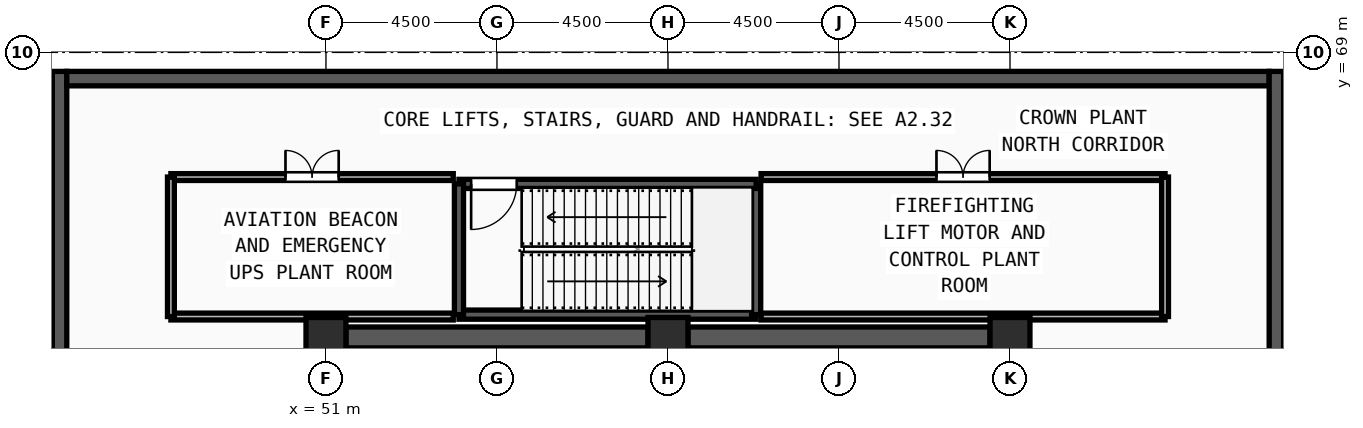
"""IFC4 building model, lengths in metres.
Left out: names, types, materials, properties, quantities, classifications, styles, units other than length and angle.
Written with IfcOpenShell. Run it as: python <this file> out.ifc"""

import sys

from ifc_helpers import new_model, si_unit, direction, frame, frame_2d, origin, origin_2d, place, context, subcontext, project, spatial, rectangle, extrude, source, transform, mapped, element, fill, save


model = new_model("IFC4")
c1 = context("Model", 3, precision=1e-05, world=origin(), true_north=direction((0.0, 1.0)))
c2 = subcontext(c1, "Body", "Model", "MODEL_VIEW")
j1 = project(units=[si_unit("LENGTHUNIT", "METRE"), si_unit("PLANEANGLEUNIT", "RADIAN")], contexts=[c1])
p1 = place(None, origin())
s1 = spatial("IfcSite", under=j1, at=p1, CompositionType="ELEMENT")
p2 = place(p1, origin())
s2 = spatial("IfcBuilding", under=s1, at=p2, CompositionType="ELEMENT")
p3 = place(p2, frame((0.0, 0.0, 366.0)))
s3 = spatial("IfcBuildingStorey", under=s2, at=p3, CompositionType="ELEMENT", Elevation=366.0)
m1 = source(origin(), c2, "Body", "SweptSolid", [
    extrude(rectangle(XDim=1.05, YDim=1.05, at=origin_2d()), origin(), (0.0, 0.0, 1.0), 5.4),
])
for number, where, z_axis, x_axis in (
    (1, (69.0, 61.5, 0.0), (0.0, 0.0, 1.0), (1.0, 0.0, 0.0)),
    (2, (60.0, 61.5, 0.0), (0.0, 0.0, 1.0), (1.0, 0.0, 0.0)),
    (3, (51.0, 61.5, 0.0), (0.0, 0.0, 1.0), (1.0, 0.0, 0.0)),
):
    element("IfcColumn", number, at=place(p3, frame(where, z_axis=z_axis, x_axis=x_axis)), inside=s3, PredefinedType="COLUMN", context=c2, shape_type="MappedRepresentation", body=[
        mapped(m1, transform((0.0, 0.0, 0.0), x_axis=(1.0, 0.0, 0.0), y_axis=(0.0, 1.0, 0.0), z_axis=(0.0, 0.0, 1.0), scale=1.0)),
    ])
p4 = place(p3, frame((43.99, 41.2, 0.0), z_axis=(0.0, 0.0, 1.0), x_axis=(0.0, 1.0, 0.0)))
e4 = element("IfcWall", 4, at=p4, inside=s3, PredefinedType="SOLIDWALL", context=c2, shape_type="SweptSolid", body=[
    extrude(rectangle(XDim=27.3, YDim=0.38, at=frame_2d((13.65, 0.0))), origin(), (0.0, 0.0, 1.0), 4.95),
])
p5 = place(p3, frame((44.18, 68.31, 0.0), z_axis=(0.0, 0.0, 1.0), x_axis=(1.0, 0.0, 0.0)))
e5 = element("IfcWall", 5, at=p5, inside=s3, PredefinedType="SOLIDWALL", context=c2, shape_type="SweptSolid", body=[
    extrude(rectangle(XDim=31.64, YDim=0.38, at=frame_2d((15.82, 0.0))), origin(), (0.0, 0.0, 1.0), 4.95),
])
p6 = place(p3, frame((76.01, 68.5, 0.0), z_axis=(0.0, 0.0, 1.0), x_axis=(0.0, -1.0, 0.0)))
e6 = element("IfcWall", 6, at=p6, inside=s3, PredefinedType="SOLIDWALL", context=c2, shape_type="SweptSolid", body=[
    extrude(rectangle(XDim=27.3, YDim=0.38, at=frame_2d((13.65, 0.0))), origin(), (0.0, 0.0, 1.0), 4.95),
])
for number, where, z_axis, x_axis in (
    (7, (51.525, 61.5, 0.0), (0.0, 0.0, 1.0), (1.0, 0.0, 0.0)),
    (8, (60.525, 61.5, 0.0), (0.0, 0.0, 1.0), (1.0, 0.0, 0.0)),
):
    element("IfcWall", number, at=place(p3, frame(where, z_axis=z_axis, x_axis=x_axis)), inside=s3, PredefinedType="SHEAR", context=c2, shape_type="SweptSolid", body=[
        extrude(rectangle(XDim=7.95, YDim=0.55, at=frame_2d((3.975, 0.0))), origin(), (0.0, 0.0, 1.0), 4.95),
    ])
p7 = place(p3, frame((54.5, 62.1, 0.0), z_axis=(0.0, 0.0, 1.0), x_axis=(1.0, 0.0, 0.0)))
e9 = element("IfcWall", 9, at=p7, inside=s3, PredefinedType="SOLIDWALL", context=c2, shape_type="SweptSolid", body=[
    extrude(rectangle(XDim=7.82, YDim=0.24, at=frame_2d((3.91, 0.0))), origin(), (0.0, 0.0, 1.0), 4.95),
])
p8 = place(p3, frame((62.32, 62.1, 0.0), z_axis=(0.0, 0.0, 1.0), x_axis=(0.0, 1.0, 0.0)))
e10 = element("IfcWall", 10, at=p8, inside=s3, PredefinedType="SOLIDWALL", context=c2, shape_type="SweptSolid", body=[
    extrude(rectangle(XDim=3.44, YDim=0.24, at=frame_2d((1.72, 0.0))), origin(), (0.0, 0.0, 1.0), 4.95),
])
p9 = place(p3, frame((62.32, 65.54, 0.0), z_axis=(0.0, 0.0, 1.0), x_axis=(-1.0, 0.0, 0.0)))
e11 = element("IfcWall", 11, at=p9, inside=s3, PredefinedType="SOLIDWALL", context=c2, shape_type="SweptSolid", body=[
    extrude(rectangle(XDim=7.82, YDim=0.24, at=frame_2d((3.91, 0.0))), origin(), (0.0, 0.0, 1.0), 4.95),
])
m2 = source(origin(), c2, "Body", "SweptSolid", [
    extrude(rectangle(XDim=1.2, YDim=2.2, at=frame_2d((0.6, 1.1))), frame((0.0, 0.13, 0.0), z_axis=(0.0, -1.0, 0.0), x_axis=(1.0, 0.0, 0.0)), (0.0, 0.0, 1.0), 0.26),
])
p10 = place(p9, frame((6.3, 0.0, 0.0)))
e12 = element("IfcOpeningElement", 12, at=p10, cuts=e11, PredefinedType="OPENING", context=c2, shape_type="MappedRepresentation", body=[
    mapped(m2, transform((0.0, 0.0, 0.0), x_axis=(1.0, 0.0, 0.0), y_axis=(0.0, 1.0, 0.0), z_axis=(0.0, 0.0, 1.0), scale=1.0)),
])
p11 = place(p3, frame((54.5, 65.54, 0.0), z_axis=(0.0, 0.0, 1.0), x_axis=(0.0, -1.0, 0.0)))
e13 = element("IfcWall", 13, at=p11, inside=s3, PredefinedType="SOLIDWALL", context=c2, shape_type="SweptSolid", body=[
    extrude(rectangle(XDim=3.44, YDim=0.24, at=frame_2d((1.72, 0.0))), origin(), (0.0, 0.0, 1.0), 4.95),
])
p12 = place(p3, frame((46.92, 65.72, 0.0), z_axis=(0.0, 0.0, 1.0), x_axis=(1.0, 0.0, 0.0)))
e14 = element("IfcWall", 14, at=p12, inside=s3, PredefinedType="PARTITIONING", context=c2, shape_type="SweptSolid", body=[
    extrude(rectangle(XDim=7.43, YDim=0.18, at=frame_2d((3.715, 0.0))), origin(), (0.0, 0.0, 1.0), 4.95),
])
m3 = source(origin(), c2, "Body", "SweptSolid", [
    extrude(rectangle(XDim=1.4, YDim=2.25, at=frame_2d((0.7, 1.125))), frame((0.0, 0.1, 0.0), z_axis=(0.0, -1.0, 0.0), x_axis=(1.0, 0.0, 0.0)), (0.0, 0.0, 1.0), 0.2),
])
p13 = place(p12, frame((3.015, 0.0, 0.0)))
e15 = element("IfcOpeningElement", 15, at=p13, cuts=e14, PredefinedType="OPENING", context=c2, shape_type="MappedRepresentation", body=[
    mapped(m3, transform((0.0, 0.0, 0.0), x_axis=(1.0, 0.0, 0.0), y_axis=(0.0, 1.0, 0.0), z_axis=(0.0, 0.0, 1.0), scale=1.0)),
])
p14 = place(p3, frame((62.45, 65.72, 0.0), z_axis=(0.0, 0.0, 1.0), x_axis=(1.0, 0.0, 0.0)))
e16 = element("IfcWall", 16, at=p14, inside=s3, PredefinedType="PARTITIONING", context=c2, shape_type="SweptSolid", body=[
    extrude(rectangle(XDim=10.63, YDim=0.18, at=frame_2d((5.315, 0.0))), origin(), (0.0, 0.0, 1.0), 4.95),
])
p15 = place(p14, frame((4.615, 0.0, 0.0)))
e17 = element("IfcOpeningElement", 17, at=p15, cuts=e16, PredefinedType="OPENING", context=c2, shape_type="MappedRepresentation", body=[
    mapped(m3, transform((0.0, 0.0, 0.0), x_axis=(1.0, 0.0, 0.0), y_axis=(0.0, 1.0, 0.0), z_axis=(0.0, 0.0, 1.0), scale=1.0)),
])
p16 = place(p3, frame((46.92, 62.05, 0.0), z_axis=(0.0, 0.0, 1.0), x_axis=(1.0, 0.0, 0.0)))
e18 = element("IfcWall", 18, at=p16, inside=s3, PredefinedType="PARTITIONING", context=c2, shape_type="SweptSolid", body=[
    extrude(rectangle(XDim=7.43, YDim=0.18, at=frame_2d((3.715, 0.0))), origin(), (0.0, 0.0, 1.0), 4.235),
])
p17 = place(p3, frame((62.45, 62.05, 0.0), z_axis=(0.0, 0.0, 1.0), x_axis=(1.0, 0.0, 0.0)))
e19 = element("IfcWall", 19, at=p17, inside=s3, PredefinedType="PARTITIONING", context=c2, shape_type="SweptSolid", body=[
    extrude(rectangle(XDim=10.63, YDim=0.18, at=frame_2d((5.315, 0.0))), origin(), (0.0, 0.0, 1.0), 4.235),
])
for number, where, z_axis, x_axis in (
    (20, (46.92, 62.05, 0.0), (0.0, 0.0, 1.0), (0.0, 1.0, 0.0)),
    (21, (73.08, 62.05, 0.0), (0.0, 0.0, 1.0), (0.0, 1.0, 0.0)),
):
    element("IfcWall", number, at=place(p3, frame(where, z_axis=z_axis, x_axis=x_axis)), inside=s3, PredefinedType="PARTITIONING", context=c2, shape_type="SweptSolid", body=[
        extrude(rectangle(XDim=3.67, YDim=0.18, at=frame_2d((1.835, 0.0))), origin(), (0.0, 0.0, 1.0), 4.95),
    ])
m4 = source(origin(), c2, "Body", "SweptSolid", [
    extrude(rectangle(XDim=1.2, YDim=2.2, at=frame_2d((0.6, 1.1))), frame((0.0, 0.025, 0.0), z_axis=(0.0, -1.0, 0.0), x_axis=(1.0, 0.0, 0.0)), (0.0, 0.0, 1.0), 0.05),
])
p18 = place(p10, origin())
e22 = element("IfcDoor", 22, at=p18, inside=s3, OperationType="SINGLE_SWING_RIGHT", PredefinedType="DOOR", context=c2, shape_type="MappedRepresentation", body=[
    mapped(m4, transform((0.0, 0.0, 0.0), x_axis=(1.0, 0.0, 0.0), y_axis=(0.0, 1.0, 0.0), z_axis=(0.0, 0.0, 1.0), scale=1.0)),
])
fill(e12, e22)
m5 = source(origin(), c2, "Body", "SweptSolid", [
    extrude(rectangle(XDim=1.4, YDim=2.25, at=frame_2d((0.7, 1.125))), frame((0.0, 0.025, 0.0), z_axis=(0.0, -1.0, 0.0), x_axis=(1.0, 0.0, 0.0)), (0.0, 0.0, 1.0), 0.05),
])
p19 = place(p13, origin())
e23 = element("IfcDoor", 23, at=p19, inside=s3, OperationType="DOUBLE_DOOR_SINGLE_SWING", PredefinedType="DOOR", context=c2, shape_type="MappedRepresentation", body=[
    mapped(m5, transform((0.0, 0.0, 0.0), x_axis=(1.0, 0.0, 0.0), y_axis=(0.0, 1.0, 0.0), z_axis=(0.0, 0.0, 1.0), scale=1.0)),
])
fill(e15, e23)
p20 = place(p15, origin())
e24 = element("IfcDoor", 24, at=p20, inside=s3, OperationType="DOUBLE_DOOR_SINGLE_SWING", PredefinedType="DOOR", context=c2, shape_type="MappedRepresentation", body=[
    mapped(m5, transform((0.0, 0.0, 0.0), x_axis=(1.0, 0.0, 0.0), y_axis=(0.0, 1.0, 0.0), z_axis=(0.0, 0.0, 1.0), scale=1.0)),
])
fill(e17, e24)
save(model, sys.argv[1])
